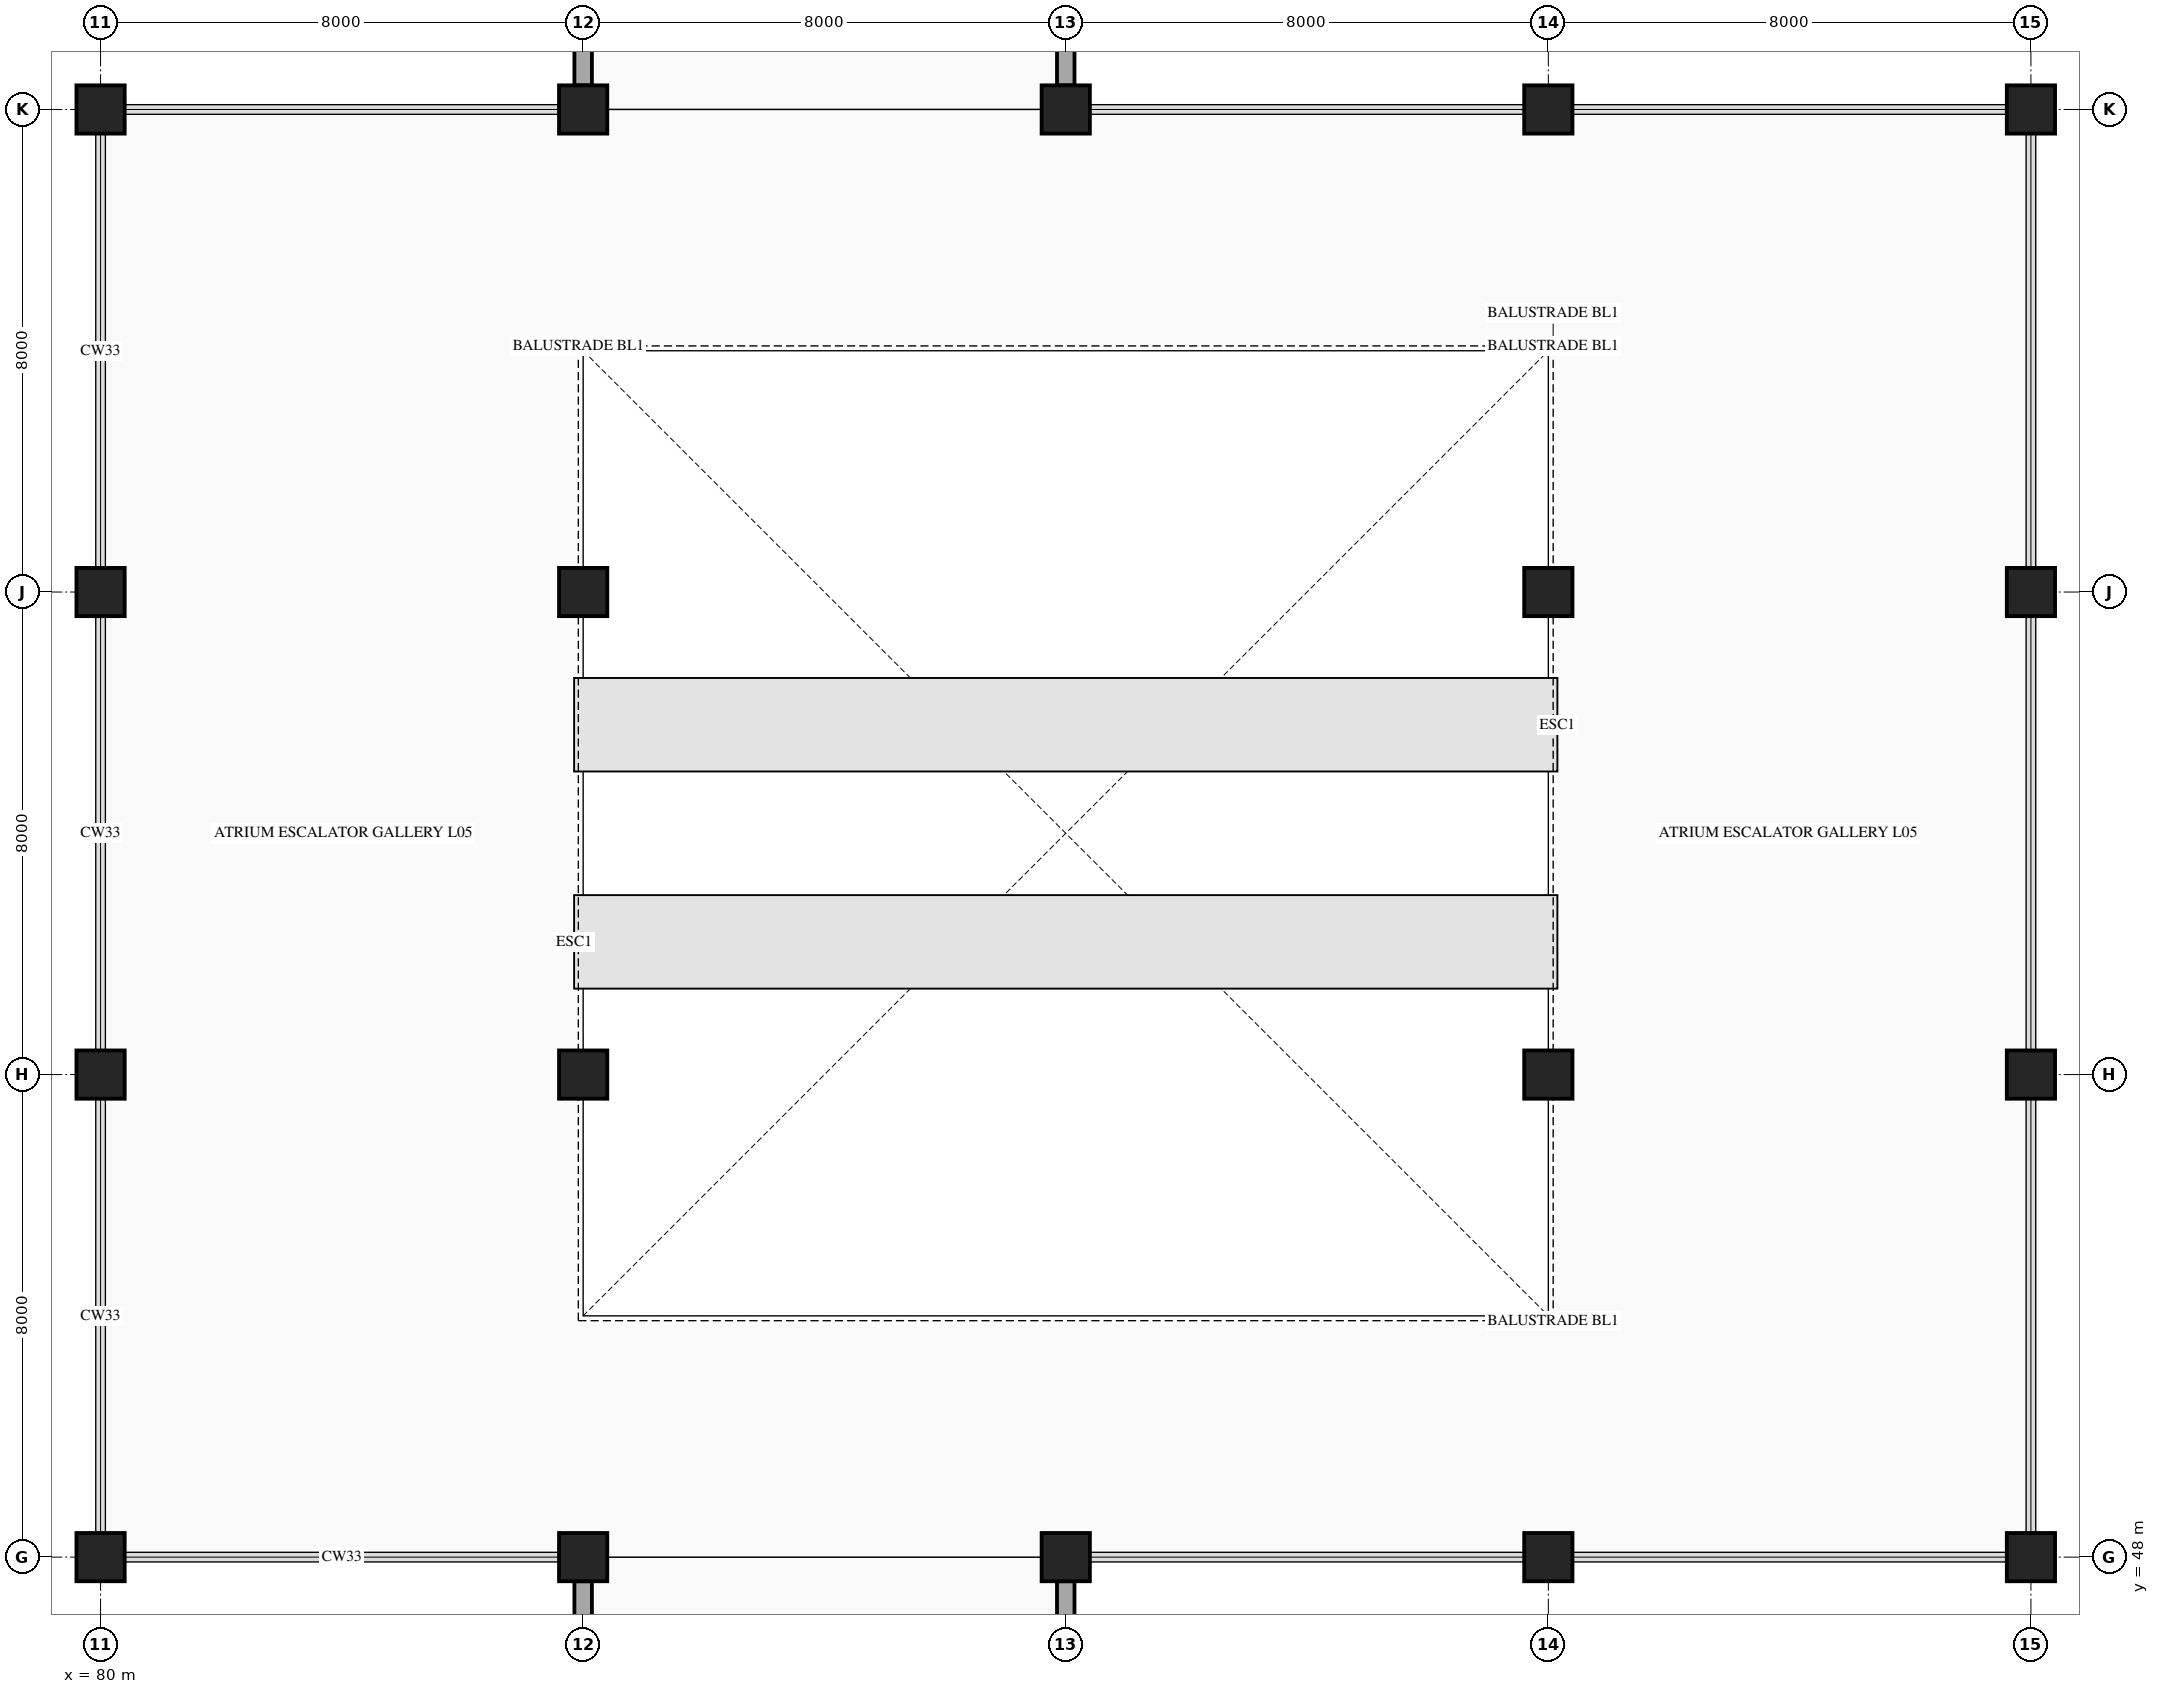
"""IFC4 building model, lengths in metres.
Left out: names, types, materials, properties, quantities, classifications, styles, units other than length and angle.
Written with IfcOpenShell. Run it as: python <this file> out.ifc"""

import sys

from ifc_helpers import new_model, si_unit, direction, frame, frame_2d, origin, origin_2d, place, context, subcontext, project, spatial, rectangle, circle, extrude, element, save


model = new_model("IFC4")
c1 = context("Model", 3, precision=1e-05, world=origin(), true_north=direction((0.0, 1.0)))
c2 = subcontext(c1, "Body", "Model", "MODEL_VIEW")
j1 = project(units=[si_unit("LENGTHUNIT", "METRE"), si_unit("PLANEANGLEUNIT", "RADIAN")], contexts=[c1])
p1 = place(None, origin())
s1 = spatial("IfcSite", under=j1, at=p1, CompositionType="ELEMENT")
p2 = place(p1, origin())
s2 = spatial("IfcBuilding", under=s1, at=p2, CompositionType="ELEMENT")
p3 = place(p2, frame((0.0, 0.0, 23.9)))
s3 = spatial("IfcBuildingStorey", under=s2, at=p3, CompositionType="ELEMENT", Elevation=23.9)
p4 = place(p3, frame((80.0, 48.0, 0.0), z_axis=(0.0, 0.0, 1.0), x_axis=(1.0, 0.0, 0.0)))
e1 = element("IfcColumn", 1, at=p4, inside=s3, PredefinedType="COLUMN", context=c2, shape_type="SweptSolid", body=[
    extrude(circle(Radius=0.4, at=origin_2d()), origin(), (0.0, 0.0, 1.0), 4.5),
])
p5 = place(p3, frame((80.0, 56.0, 0.0), z_axis=(0.0, 0.0, 1.0), x_axis=(1.0, 0.0, 0.0)))
e2 = element("IfcColumn", 2, at=p5, inside=s3, PredefinedType="COLUMN", context=c2, shape_type="SweptSolid", body=[
    extrude(rectangle(XDim=0.8, YDim=0.8, at=origin_2d()), origin(), (0.0, 0.0, 1.0), 4.5),
])
p6 = place(p3, frame((80.0, 64.0, 0.0), z_axis=(0.0, 0.0, 1.0), x_axis=(1.0, 0.0, 0.0)))
e3 = element("IfcColumn", 3, at=p6, inside=s3, PredefinedType="COLUMN", context=c2, shape_type="SweptSolid", body=[
    extrude(circle(Radius=0.4, at=origin_2d()), origin(), (0.0, 0.0, 1.0), 4.5),
])
for number, where, z_axis, x_axis in (
    (4, (80.0, 72.0, 0.0), (0.0, 0.0, 1.0), (1.0, 0.0, 0.0)),
    (5, (88.0, 48.0, 0.0), (0.0, 0.0, 1.0), (1.0, 0.0, 0.0)),
):
    element("IfcColumn", number, at=place(p3, frame(where, z_axis=z_axis, x_axis=x_axis)), inside=s3, PredefinedType="COLUMN", context=c2, shape_type="SweptSolid", body=[
        extrude(rectangle(XDim=0.8, YDim=0.8, at=origin_2d()), origin(), (0.0, 0.0, 1.0), 4.5),
    ])
p7 = place(p3, frame((88.0, 56.0, 0.0), z_axis=(0.0, 0.0, 1.0), x_axis=(1.0, 0.0, 0.0)))
e6 = element("IfcColumn", 6, at=p7, inside=s3, PredefinedType="COLUMN", context=c2, shape_type="SweptSolid", body=[
    extrude(circle(Radius=0.4, at=origin_2d()), origin(), (0.0, 0.0, 1.0), 4.5),
])
p8 = place(p3, frame((88.0, 64.0, 0.0), z_axis=(0.0, 0.0, 1.0), x_axis=(1.0, 0.0, 0.0)))
e7 = element("IfcColumn", 7, at=p8, inside=s3, PredefinedType="COLUMN", context=c2, shape_type="SweptSolid", body=[
    extrude(rectangle(XDim=0.8, YDim=0.8, at=origin_2d()), origin(), (0.0, 0.0, 1.0), 4.5),
])
for number, where, z_axis, x_axis in (
    (8, (88.0, 72.0, 0.0), (0.0, 0.0, 1.0), (1.0, 0.0, 0.0)),
    (9, (96.0, 48.0, 0.0), (0.0, 0.0, 1.0), (1.0, 0.0, 0.0)),
):
    element("IfcColumn", number, at=place(p3, frame(where, z_axis=z_axis, x_axis=x_axis)), inside=s3, PredefinedType="COLUMN", context=c2, shape_type="SweptSolid", body=[
        extrude(circle(Radius=0.4, at=origin_2d()), origin(), (0.0, 0.0, 1.0), 4.5),
    ])
for number, where, z_axis, x_axis in (
    (10, (96.0, 72.0, 0.0), (0.0, 0.0, 1.0), (1.0, 0.0, 0.0)),
    (11, (104.0, 48.0, 0.0), (0.0, 0.0, 1.0), (1.0, 0.0, 0.0)),
):
    element("IfcColumn", number, at=place(p3, frame(where, z_axis=z_axis, x_axis=x_axis)), inside=s3, PredefinedType="COLUMN", context=c2, shape_type="SweptSolid", body=[
        extrude(rectangle(XDim=0.8, YDim=0.8, at=origin_2d()), origin(), (0.0, 0.0, 1.0), 4.5),
    ])
p9 = place(p3, frame((104.0, 56.0, 0.0), z_axis=(0.0, 0.0, 1.0), x_axis=(1.0, 0.0, 0.0)))
e12 = element("IfcColumn", 12, at=p9, inside=s3, PredefinedType="COLUMN", context=c2, shape_type="SweptSolid", body=[
    extrude(circle(Radius=0.4, at=origin_2d()), origin(), (0.0, 0.0, 1.0), 4.5),
])
p10 = place(p3, frame((104.0, 64.0, 0.0), z_axis=(0.0, 0.0, 1.0), x_axis=(1.0, 0.0, 0.0)))
e13 = element("IfcColumn", 13, at=p10, inside=s3, PredefinedType="COLUMN", context=c2, shape_type="SweptSolid", body=[
    extrude(rectangle(XDim=0.8, YDim=0.8, at=origin_2d()), origin(), (0.0, 0.0, 1.0), 4.5),
])
for number, where, z_axis, x_axis in (
    (14, (104.0, 72.0, 0.0), (0.0, 0.0, 1.0), (1.0, 0.0, 0.0)),
    (15, (112.0, 48.0, 0.0), (0.0, 0.0, 1.0), (1.0, 0.0, 0.0)),
):
    element("IfcColumn", number, at=place(p3, frame(where, z_axis=z_axis, x_axis=x_axis)), inside=s3, PredefinedType="COLUMN", context=c2, shape_type="SweptSolid", body=[
        extrude(circle(Radius=0.4, at=origin_2d()), origin(), (0.0, 0.0, 1.0), 4.5),
    ])
p11 = place(p3, frame((112.0, 56.0, 0.0), z_axis=(0.0, 0.0, 1.0), x_axis=(1.0, 0.0, 0.0)))
e16 = element("IfcColumn", 16, at=p11, inside=s3, PredefinedType="COLUMN", context=c2, shape_type="SweptSolid", body=[
    extrude(rectangle(XDim=0.8, YDim=0.8, at=origin_2d()), origin(), (0.0, 0.0, 1.0), 4.5),
])
p12 = place(p3, frame((112.0, 64.0, 0.0), z_axis=(0.0, 0.0, 1.0), x_axis=(1.0, 0.0, 0.0)))
e17 = element("IfcColumn", 17, at=p12, inside=s3, PredefinedType="COLUMN", context=c2, shape_type="SweptSolid", body=[
    extrude(circle(Radius=0.4, at=origin_2d()), origin(), (0.0, 0.0, 1.0), 4.5),
])
p13 = place(p3, frame((112.0, 72.0, 0.0), z_axis=(0.0, 0.0, 1.0), x_axis=(1.0, 0.0, 0.0)))
e18 = element("IfcColumn", 18, at=p13, inside=s3, PredefinedType="COLUMN", context=c2, shape_type="SweptSolid", body=[
    extrude(rectangle(XDim=0.8, YDim=0.8, at=origin_2d()), origin(), (0.0, 0.0, 1.0), 4.5),
])
p14 = place(p3, frame((88.0, 40.375, 0.0), z_axis=(0.0, 0.0, 1.0), x_axis=(0.0, 1.0, 0.0)))
e19 = element("IfcWall", 19, at=p14, inside=s3, PredefinedType="STANDARD", context=c2, shape_type="SweptSolid", body=[
    extrude(rectangle(XDim=7.225, YDim=0.29, at=frame_2d((3.613, 0.0))), origin(), (0.0, 0.0, 1.0), 3.48),
])
p15 = place(p14, frame((2.413, 0.0, 0.8)))
e20 = element("IfcOpeningElement", 20, at=p15, cuts=e19, PredefinedType="OPENING", context=c2, shape_type="SweptSolid", body=[
    extrude(rectangle(XDim=2.4, YDim=1.8, at=frame_2d((1.2, 0.9))), frame((0.0, 0.155, 0.0), z_axis=(0.0, -1.0, 0.0), x_axis=(1.0, 0.0, 0.0)), (0.0, 0.0, 1.0), 0.31),
])
p16 = place(p3, frame((88.0, 72.4, 0.0), z_axis=(0.0, 0.0, 1.0), x_axis=(0.0, 1.0, 0.0)))
e21 = element("IfcWall", 21, at=p16, inside=s3, PredefinedType="STANDARD", context=c2, shape_type="SweptSolid", body=[
    extrude(rectangle(XDim=7.275, YDim=0.29, at=frame_2d((3.638, 0.0))), origin(), (0.0, 0.0, 1.0), 3.48),
])
p17 = place(p16, frame((2.687, 0.0, 0.8)))
e22 = element("IfcOpeningElement", 22, at=p17, cuts=e21, PredefinedType="OPENING", context=c2, shape_type="SweptSolid", body=[
    extrude(rectangle(XDim=1.9, YDim=1.85, at=frame_2d((0.95, 0.925))), frame((0.0, 0.155, 0.0), z_axis=(0.0, -1.0, 0.0), x_axis=(1.0, 0.0, 0.0)), (0.0, 0.0, 1.0), 0.31),
])
p18 = place(p3, frame((96.0, 79.675, 0.0), z_axis=(0.0, 0.0, 1.0), x_axis=(0.0, -1.0, 0.0)))
e23 = element("IfcWall", 23, at=p18, inside=s3, PredefinedType="STANDARD", context=c2, shape_type="SweptSolid", body=[
    extrude(rectangle(XDim=7.275, YDim=0.29, at=frame_2d((3.638, 0.0))), origin(), (0.0, 0.0, 1.0), 3.48),
])
p19 = place(p18, frame((2.437, 0.0, 0.8)))
e24 = element("IfcOpeningElement", 24, at=p19, cuts=e23, PredefinedType="OPENING", context=c2, shape_type="SweptSolid", body=[
    extrude(rectangle(XDim=2.4, YDim=1.8, at=frame_2d((1.2, 0.9))), frame((0.0, 0.155, 0.0), z_axis=(0.0, -1.0, 0.0), x_axis=(1.0, 0.0, 0.0)), (0.0, 0.0, 1.0), 0.31),
])
p20 = place(p3, frame((96.0, 47.6, 0.0), z_axis=(0.0, 0.0, 1.0), x_axis=(0.0, -1.0, 0.0)))
e25 = element("IfcWall", 25, at=p20, inside=s3, PredefinedType="STANDARD", context=c2, shape_type="SweptSolid", body=[
    extrude(rectangle(XDim=7.225, YDim=0.29, at=frame_2d((3.613, 0.0))), origin(), (0.0, 0.0, 1.0), 3.48),
])
p21 = place(p20, frame((2.663, 0.0, 0.8)))
e26 = element("IfcOpeningElement", 26, at=p21, cuts=e25, PredefinedType="OPENING", context=c2, shape_type="SweptSolid", body=[
    extrude(rectangle(XDim=1.9, YDim=1.85, at=frame_2d((0.95, 0.925))), frame((0.0, 0.155, 0.0), z_axis=(0.0, -1.0, 0.0), x_axis=(1.0, 0.0, 0.0)), (0.0, 0.0, 1.0), 0.31),
])
save(model, sys.argv[1])
